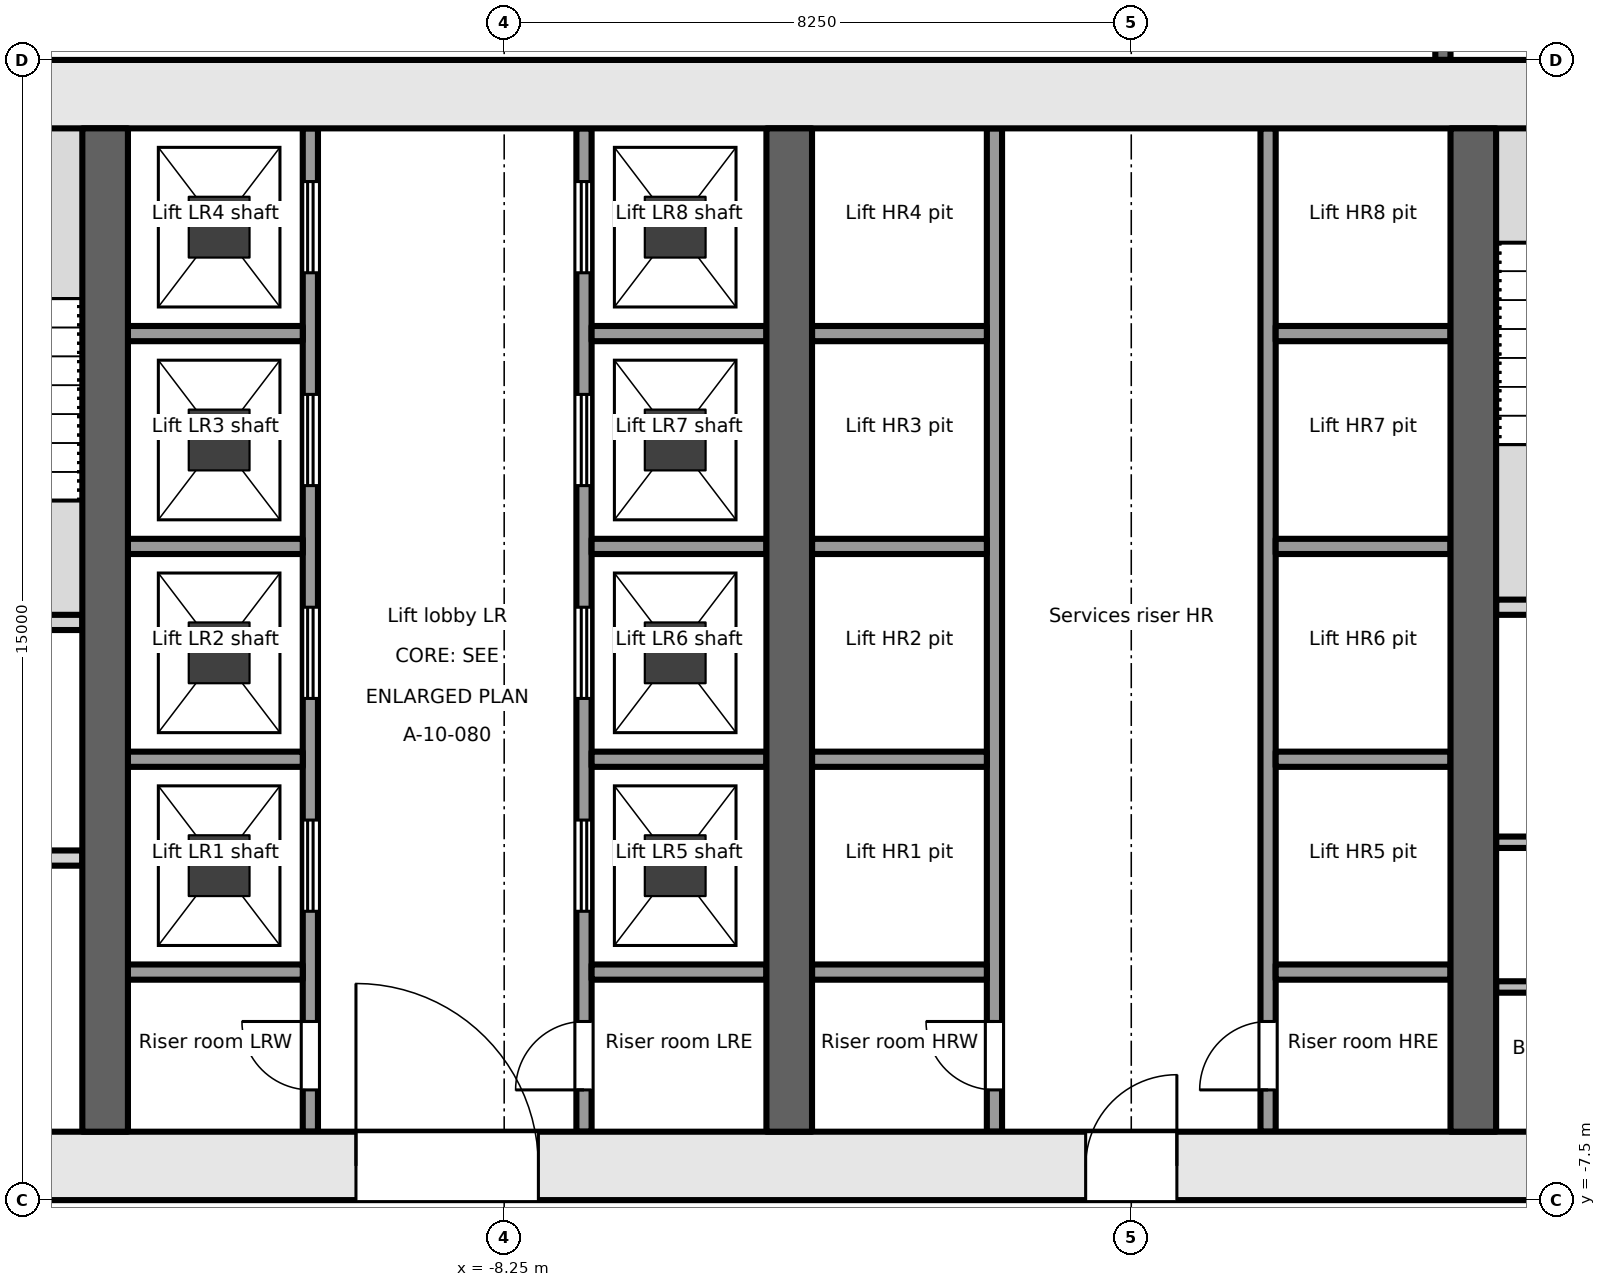
"""IFC4 building model, lengths in metres.
Left out: names, types, materials, properties, quantities, classifications, styles, units other than length and angle.
Written with IfcOpenShell. Run it as: python <this file> out.ifc"""

import sys

from ifc_helpers import new_model, si_unit, direction, frame, frame_2d, origin, place, context, subcontext, project, spatial, rectangle, extrude, element, fill, save


model = new_model("IFC4")
c1 = context("Model", 3, precision=1e-05, world=origin(), true_north=direction((0.0, 1.0)))
c2 = subcontext(c1, "Body", "Model", "MODEL_VIEW")
j1 = project(units=[si_unit("LENGTHUNIT", "METRE"), si_unit("PLANEANGLEUNIT", "RADIAN")], contexts=[c1])
p1 = place(None, origin())
s1 = spatial("IfcSite", under=j1, at=p1, CompositionType="ELEMENT")
p2 = place(p1, origin())
s2 = spatial("IfcBuilding", under=s1, at=p2, CompositionType="ELEMENT")
p3 = place(p2, frame((0.0, 0.0, -5.5)))
s3 = spatial("IfcBuildingStorey", under=s2, at=p3, CompositionType="ELEMENT", Elevation=-5.5)
p4 = place(p3, frame((-18.0, -7.05, -0.2), z_axis=(0.0, 0.0, 1.0), x_axis=(1.0, 0.0, 0.0)))
e1 = element("IfcWall", 1, at=p4, inside=s3, PredefinedType="SHEAR", context=c2, shape_type="SweptSolid", body=[
    extrude(rectangle(XDim=36.0, YDim=0.9, at=frame_2d((18.0, 0.0))), origin(), (0.0, 0.0, 1.0), 5.5),
])
p5 = place(p4, frame((7.8, 0.0, 0.2)))
e2 = element("IfcOpeningElement", 2, at=p5, cuts=e1, PredefinedType="OPENING", context=c2, shape_type="SweptSolid", body=[
    extrude(rectangle(XDim=2.4, YDim=2.1, at=frame_2d((1.2, 1.05))), frame((0.0, 0.46, 0.0), z_axis=(0.0, -1.0, 0.0), x_axis=(1.0, 0.0, 0.0)), (0.0, 0.0, 1.0), 0.921),
])
p6 = place(p4, frame((17.4, 0.0, 0.2)))
e3 = element("IfcOpeningElement", 3, at=p6, cuts=e1, PredefinedType="OPENING", context=c2, shape_type="SweptSolid", body=[
    extrude(rectangle(XDim=1.2, YDim=2.1, at=frame_2d((0.6, 1.05))), frame((0.0, 0.46, 0.0), z_axis=(0.0, -1.0, 0.0), x_axis=(1.0, 0.0, 0.0)), (0.0, 0.0, 1.0), 0.921),
])
p7 = place(p4, frame((26.1, 0.0, 0.2)))
e4 = element("IfcOpeningElement", 4, at=p7, cuts=e1, PredefinedType="OPENING", context=c2, shape_type="SweptSolid", body=[
    extrude(rectangle(XDim=2.4, YDim=2.1, at=frame_2d((1.2, 1.05))), frame((0.0, 0.46, 0.0), z_axis=(0.0, -1.0, 0.0), x_axis=(1.0, 0.0, 0.0)), (0.0, 0.0, 1.0), 0.921),
])
p8 = place(p3, frame((-18.0, 7.05, -0.2), z_axis=(0.0, 0.0, 1.0), x_axis=(1.0, 0.0, 0.0)))
e5 = element("IfcWall", 5, at=p8, inside=s3, PredefinedType="SHEAR", context=c2, shape_type="SweptSolid", body=[
    extrude(rectangle(XDim=36.0, YDim=0.9, at=frame_2d((18.0, 0.0))), origin(), (0.0, 0.0, 1.0), 5.5),
])
for number, where, z_axis, x_axis in (
    (6, (-13.5, -6.6, -0.2), (0.0, 0.0, 1.0), (0.0, 1.0, 0.0)),
    (7, (-4.5, -6.6, -0.2), (0.0, 0.0, 1.0), (0.0, 1.0, 0.0)),
    (8, (4.5, -6.6, -0.2), (0.0, 0.0, 1.0), (0.0, 1.0, 0.0)),
):
    element("IfcWall", number, at=place(p3, frame(where, z_axis=z_axis, x_axis=x_axis)), inside=s3, PredefinedType="SHEAR", context=c2, shape_type="SweptSolid", body=[
        extrude(rectangle(XDim=13.2, YDim=0.6, at=frame_2d((6.6, 0.0))), origin(), (0.0, 0.0, 1.0), 5.5),
    ])
p9 = place(p3, frame((-17.1, -3.0, 0.0), z_axis=(0.0, 0.0, 1.0), x_axis=(1.0, 0.0, 0.0)))
e9 = element("IfcWall", 9, at=p9, inside=s3, PredefinedType="PARTITIONING", context=c2, shape_type="SweptSolid", body=[
    extrude(rectangle(XDim=3.3, YDim=0.2, at=frame_2d((1.65, 0.0))), origin(), (0.0, 0.0, 1.0), 5.3),
])
p10 = place(p9, frame((1.1, 0.0, 0.0)))
e10 = element("IfcOpeningElement", 10, at=p10, cuts=e9, PredefinedType="OPENING", context=c2, shape_type="SweptSolid", body=[
    extrude(rectangle(XDim=1.1, YDim=2.1, at=frame_2d((0.55, 1.05))), frame((0.0, 0.111, 0.0), z_axis=(0.0, -1.0, 0.0), x_axis=(1.0, 0.0, 0.0)), (0.0, 0.0, 1.0), 0.221),
])
p11 = place(p3, frame((-17.1, 0.1, 0.0), z_axis=(0.0, 0.0, 1.0), x_axis=(1.0, 0.0, 0.0)))
e11 = element("IfcWall", 11, at=p11, inside=s3, PredefinedType="PARTITIONING", context=c2, shape_type="SweptSolid", body=[
    extrude(rectangle(XDim=3.3, YDim=0.2, at=frame_2d((1.65, 0.0))), origin(), (0.0, 0.0, 1.0), 5.3),
])
p12 = place(p11, frame((1.1, 0.0, 0.0)))
e12 = element("IfcOpeningElement", 12, at=p12, cuts=e11, PredefinedType="OPENING", context=c2, shape_type="SweptSolid", body=[
    extrude(rectangle(XDim=1.1, YDim=2.1, at=frame_2d((0.55, 1.05))), frame((0.0, 0.111, 0.0), z_axis=(0.0, -1.0, 0.0), x_axis=(1.0, 0.0, 0.0)), (0.0, 0.0, 1.0), 0.221),
])
p13 = place(p3, frame((-10.8, -6.6, 0.0), z_axis=(0.0, 0.0, 1.0), x_axis=(0.0, 1.0, 0.0)))
e13 = element("IfcWall", 13, at=p13, inside=s3, PredefinedType="PARTITIONING", context=c2, shape_type="SweptSolid", body=[
    extrude(rectangle(XDim=13.2, YDim=0.2, at=frame_2d((6.6, 0.0))), origin(), (0.0, 0.0, 1.0), 5.3),
])
p14 = place(p13, frame((0.55, 0.0, 0.0)))
e14 = element("IfcOpeningElement", 14, at=p14, cuts=e13, PredefinedType="OPENING", context=c2, shape_type="SweptSolid", body=[
    extrude(rectangle(XDim=0.9, YDim=2.1, at=frame_2d((0.45, 1.05))), frame((0.0, 0.111, 0.0), z_axis=(0.0, -1.0, 0.0), x_axis=(1.0, 0.0, 0.0)), (0.0, 0.0, 1.0), 0.221),
])
p15 = place(p13, frame((2.9, 0.0, 0.0)))
e15 = element("IfcOpeningElement", 15, at=p15, cuts=e13, PredefinedType="OPENING", context=c2, shape_type="SweptSolid", body=[
    extrude(rectangle(XDim=1.2, YDim=2.1, at=frame_2d((0.6, 1.05))), frame((0.0, 0.111, 0.0), z_axis=(0.0, -1.0, 0.0), x_axis=(1.0, 0.0, 0.0)), (0.0, 0.0, 1.0), 0.221),
])
p16 = place(p13, frame((5.7, 0.0, 0.0)))
e16 = element("IfcOpeningElement", 16, at=p16, cuts=e13, PredefinedType="OPENING", context=c2, shape_type="SweptSolid", body=[
    extrude(rectangle(XDim=1.2, YDim=2.1, at=frame_2d((0.6, 1.05))), frame((0.0, 0.111, 0.0), z_axis=(0.0, -1.0, 0.0), x_axis=(1.0, 0.0, 0.0)), (0.0, 0.0, 1.0), 0.221),
])
p17 = place(p13, frame((8.5, 0.0, 0.0)))
e17 = element("IfcOpeningElement", 17, at=p17, cuts=e13, PredefinedType="OPENING", context=c2, shape_type="SweptSolid", body=[
    extrude(rectangle(XDim=1.2, YDim=2.1, at=frame_2d((0.6, 1.05))), frame((0.0, 0.111, 0.0), z_axis=(0.0, -1.0, 0.0), x_axis=(1.0, 0.0, 0.0)), (0.0, 0.0, 1.0), 0.221),
])
p18 = place(p13, frame((11.3, 0.0, 0.0)))
e18 = element("IfcOpeningElement", 18, at=p18, cuts=e13, PredefinedType="OPENING", context=c2, shape_type="SweptSolid", body=[
    extrude(rectangle(XDim=1.2, YDim=2.1, at=frame_2d((0.6, 1.05))), frame((0.0, 0.111, 0.0), z_axis=(0.0, -1.0, 0.0), x_axis=(1.0, 0.0, 0.0)), (0.0, 0.0, 1.0), 0.221),
])
p19 = place(p3, frame((-7.2, -6.6, 0.0), z_axis=(0.0, 0.0, 1.0), x_axis=(0.0, 1.0, 0.0)))
e19 = element("IfcWall", 19, at=p19, inside=s3, PredefinedType="PARTITIONING", context=c2, shape_type="SweptSolid", body=[
    extrude(rectangle(XDim=13.2, YDim=0.2, at=frame_2d((6.6, 0.0))), origin(), (0.0, 0.0, 1.0), 5.3),
])
p20 = place(p19, frame((0.55, 0.0, 0.0)))
e20 = element("IfcOpeningElement", 20, at=p20, cuts=e19, PredefinedType="OPENING", context=c2, shape_type="SweptSolid", body=[
    extrude(rectangle(XDim=0.9, YDim=2.1, at=frame_2d((0.45, 1.05))), frame((0.0, 0.111, 0.0), z_axis=(0.0, -1.0, 0.0), x_axis=(1.0, 0.0, 0.0)), (0.0, 0.0, 1.0), 0.221),
])
p21 = place(p19, frame((2.9, 0.0, 0.0)))
e21 = element("IfcOpeningElement", 21, at=p21, cuts=e19, PredefinedType="OPENING", context=c2, shape_type="SweptSolid", body=[
    extrude(rectangle(XDim=1.2, YDim=2.1, at=frame_2d((0.6, 1.05))), frame((0.0, 0.111, 0.0), z_axis=(0.0, -1.0, 0.0), x_axis=(1.0, 0.0, 0.0)), (0.0, 0.0, 1.0), 0.221),
])
p22 = place(p19, frame((5.7, 0.0, 0.0)))
e22 = element("IfcOpeningElement", 22, at=p22, cuts=e19, PredefinedType="OPENING", context=c2, shape_type="SweptSolid", body=[
    extrude(rectangle(XDim=1.2, YDim=2.1, at=frame_2d((0.6, 1.05))), frame((0.0, 0.111, 0.0), z_axis=(0.0, -1.0, 0.0), x_axis=(1.0, 0.0, 0.0)), (0.0, 0.0, 1.0), 0.221),
])
p23 = place(p19, frame((8.5, 0.0, 0.0)))
e23 = element("IfcOpeningElement", 23, at=p23, cuts=e19, PredefinedType="OPENING", context=c2, shape_type="SweptSolid", body=[
    extrude(rectangle(XDim=1.2, YDim=2.1, at=frame_2d((0.6, 1.05))), frame((0.0, 0.111, 0.0), z_axis=(0.0, -1.0, 0.0), x_axis=(1.0, 0.0, 0.0)), (0.0, 0.0, 1.0), 0.221),
])
p24 = place(p19, frame((11.3, 0.0, 0.0)))
e24 = element("IfcOpeningElement", 24, at=p24, cuts=e19, PredefinedType="OPENING", context=c2, shape_type="SweptSolid", body=[
    extrude(rectangle(XDim=1.2, YDim=2.1, at=frame_2d((0.6, 1.05))), frame((0.0, 0.111, 0.0), z_axis=(0.0, -1.0, 0.0), x_axis=(1.0, 0.0, 0.0)), (0.0, 0.0, 1.0), 0.221),
])
for number, where, z_axis, x_axis in (
    (25, (-13.2, -1.7, 0.0), (0.0, 0.0, 1.0), (1.0, 0.0, 0.0)),
    (26, (-13.2, 1.1, 0.0), (0.0, 0.0, 1.0), (1.0, 0.0, 0.0)),
    (27, (-13.2, 3.9, 0.0), (0.0, 0.0, 1.0), (1.0, 0.0, 0.0)),
    (28, (-13.2, -4.5, 0.0), (0.0, 0.0, 1.0), (1.0, 0.0, 0.0)),
    (29, (-7.1, -1.7, 0.0), (0.0, 0.0, 1.0), (1.0, 0.0, 0.0)),
    (30, (-7.1, 1.1, 0.0), (0.0, 0.0, 1.0), (1.0, 0.0, 0.0)),
    (31, (-7.1, 3.9, 0.0), (0.0, 0.0, 1.0), (1.0, 0.0, 0.0)),
    (32, (-7.1, -4.5, 0.0), (0.0, 0.0, 1.0), (1.0, 0.0, 0.0)),
):
    element("IfcWall", number, at=place(p3, frame(where, z_axis=z_axis, x_axis=x_axis)), inside=s3, PredefinedType="PARTITIONING", context=c2, shape_type="SweptSolid", body=[
        extrude(rectangle(XDim=2.3, YDim=0.2, at=frame_2d((1.15, 0.0))), origin(), (0.0, 0.0, 1.0), 5.3),
    ])
p25 = place(p3, frame((-1.8, -6.6, 0.0), z_axis=(0.0, 0.0, 1.0), x_axis=(0.0, 1.0, 0.0)))
e33 = element("IfcWall", 33, at=p25, inside=s3, PredefinedType="PARTITIONING", context=c2, shape_type="SweptSolid", body=[
    extrude(rectangle(XDim=13.2, YDim=0.2, at=frame_2d((6.6, 0.0))), origin(), (0.0, 0.0, 1.0), 5.3),
])
p26 = place(p25, frame((0.55, 0.0, 0.0)))
e34 = element("IfcOpeningElement", 34, at=p26, cuts=e33, PredefinedType="OPENING", context=c2, shape_type="SweptSolid", body=[
    extrude(rectangle(XDim=0.9, YDim=2.1, at=frame_2d((0.45, 1.05))), frame((0.0, 0.111, 0.0), z_axis=(0.0, -1.0, 0.0), x_axis=(1.0, 0.0, 0.0)), (0.0, 0.0, 1.0), 0.221),
])
p27 = place(p3, frame((1.8, -6.6, 0.0), z_axis=(0.0, 0.0, 1.0), x_axis=(0.0, 1.0, 0.0)))
e35 = element("IfcWall", 35, at=p27, inside=s3, PredefinedType="PARTITIONING", context=c2, shape_type="SweptSolid", body=[
    extrude(rectangle(XDim=13.2, YDim=0.2, at=frame_2d((6.6, 0.0))), origin(), (0.0, 0.0, 1.0), 5.3),
])
p28 = place(p27, frame((0.55, 0.0, 0.0)))
e36 = element("IfcOpeningElement", 36, at=p28, cuts=e35, PredefinedType="OPENING", context=c2, shape_type="SweptSolid", body=[
    extrude(rectangle(XDim=0.9, YDim=2.1, at=frame_2d((0.45, 1.05))), frame((0.0, 0.111, 0.0), z_axis=(0.0, -1.0, 0.0), x_axis=(1.0, 0.0, 0.0)), (0.0, 0.0, 1.0), 0.221),
])
for number, where, z_axis, x_axis in (
    (37, (-4.2, -1.7, 0.0), (0.0, 0.0, 1.0), (1.0, 0.0, 0.0)),
    (38, (-4.2, 1.1, 0.0), (0.0, 0.0, 1.0), (1.0, 0.0, 0.0)),
    (39, (-4.2, 3.9, 0.0), (0.0, 0.0, 1.0), (1.0, 0.0, 0.0)),
    (40, (-4.2, -4.5, 0.0), (0.0, 0.0, 1.0), (1.0, 0.0, 0.0)),
    (41, (1.9, -1.7, 0.0), (0.0, 0.0, 1.0), (1.0, 0.0, 0.0)),
    (42, (1.9, 1.1, 0.0), (0.0, 0.0, 1.0), (1.0, 0.0, 0.0)),
    (43, (1.9, 3.9, 0.0), (0.0, 0.0, 1.0), (1.0, 0.0, 0.0)),
    (44, (1.9, -4.5, 0.0), (0.0, 0.0, 1.0), (1.0, 0.0, 0.0)),
):
    element("IfcWall", number, at=place(p3, frame(where, z_axis=z_axis, x_axis=x_axis)), inside=s3, PredefinedType="PARTITIONING", context=c2, shape_type="SweptSolid", body=[
        extrude(rectangle(XDim=2.3, YDim=0.2, at=frame_2d((1.15, 0.0))), origin(), (0.0, 0.0, 1.0), 5.3),
    ])
p29 = place(p3, frame((4.8, 0.3, 0.0), z_axis=(0.0, 0.0, 1.0), x_axis=(1.0, 0.0, 0.0)))
e45 = element("IfcWall", 45, at=p29, inside=s3, PredefinedType="PARTITIONING", context=c2, shape_type="SweptSolid", body=[
    extrude(rectangle(XDim=3.15, YDim=0.2, at=frame_2d((1.575, 0.0))), origin(), (0.0, 0.0, 1.0), 5.3),
])
for number, where, z_axis, x_axis in (
    (46, (4.8, -4.696, 0.0), (0.0, 0.0, 1.0), (1.0, 0.0, 0.0)),
    (47, (4.8, -2.792, 0.0), (0.0, 0.0, 1.0), (1.0, 0.0, 0.0)),
):
    element("IfcWall", number, at=place(p3, frame(where, z_axis=z_axis, x_axis=x_axis)), inside=s3, PredefinedType="PARTITIONING", context=c2, shape_type="SweptSolid", body=[
        extrude(rectangle(XDim=3.15, YDim=0.15, at=frame_2d((1.575, 0.0))), origin(), (0.0, 0.0, 1.0), 5.3),
    ])
p30 = place(p3, frame((4.1, 13.74, 0.0), z_axis=(0.0, 0.0, 1.0), x_axis=(0.0, -1.0, 0.0)))
e48 = element("IfcWall", 48, at=p30, inside=s3, PredefinedType="PARTITIONING", context=c2, shape_type="SweptSolid", body=[
    extrude(rectangle(XDim=6.24, YDim=0.2, at=frame_2d((3.12, 0.0))), origin(), (0.0, 0.0, 1.0), 4.3),
])
p31 = place(p14, origin())
e49 = element("IfcDoor", 49, at=p31, inside=s3, OperationType="SINGLE_SWING_RIGHT", PredefinedType="DOOR", context=c2, shape_type="SweptSolid", body=[
    extrude(rectangle(XDim=0.9, YDim=2.1, at=frame_2d((0.45, 1.05))), frame((0.0, 0.025, 0.0), z_axis=(0.0, -1.0, 0.0), x_axis=(1.0, 0.0, 0.0)), (0.0, 0.0, 1.0), 0.05),
])
fill(e14, e49)
p32 = place(p15, origin())
e50 = element("IfcDoor", 50, at=p32, inside=s3, OperationType="DOUBLE_DOOR_SLIDING", PredefinedType="DOOR", context=c2, shape_type="SweptSolid", body=[
    extrude(rectangle(XDim=1.2, YDim=2.1, at=frame_2d((0.6, 1.05))), frame((0.0, 0.025, 0.0), z_axis=(0.0, -1.0, 0.0), x_axis=(1.0, 0.0, 0.0)), (0.0, 0.0, 1.0), 0.05),
])
fill(e15, e50)
p33 = place(p16, origin())
e51 = element("IfcDoor", 51, at=p33, inside=s3, OperationType="DOUBLE_DOOR_SLIDING", PredefinedType="DOOR", context=c2, shape_type="SweptSolid", body=[
    extrude(rectangle(XDim=1.2, YDim=2.1, at=frame_2d((0.6, 1.05))), frame((0.0, 0.025, 0.0), z_axis=(0.0, -1.0, 0.0), x_axis=(1.0, 0.0, 0.0)), (0.0, 0.0, 1.0), 0.05),
])
fill(e16, e51)
p34 = place(p17, origin())
e52 = element("IfcDoor", 52, at=p34, inside=s3, OperationType="DOUBLE_DOOR_SLIDING", PredefinedType="DOOR", context=c2, shape_type="SweptSolid", body=[
    extrude(rectangle(XDim=1.2, YDim=2.1, at=frame_2d((0.6, 1.05))), frame((0.0, 0.025, 0.0), z_axis=(0.0, -1.0, 0.0), x_axis=(1.0, 0.0, 0.0)), (0.0, 0.0, 1.0), 0.05),
])
fill(e17, e52)
p35 = place(p18, origin())
e53 = element("IfcDoor", 53, at=p35, inside=s3, OperationType="DOUBLE_DOOR_SLIDING", PredefinedType="DOOR", context=c2, shape_type="SweptSolid", body=[
    extrude(rectangle(XDim=1.2, YDim=2.1, at=frame_2d((0.6, 1.05))), frame((0.0, 0.025, 0.0), z_axis=(0.0, -1.0, 0.0), x_axis=(1.0, 0.0, 0.0)), (0.0, 0.0, 1.0), 0.05),
])
fill(e18, e53)
p36 = place(p20, origin())
e54 = element("IfcDoor", 54, at=p36, inside=s3, OperationType="SINGLE_SWING_LEFT", PredefinedType="DOOR", context=c2, shape_type="SweptSolid", body=[
    extrude(rectangle(XDim=0.9, YDim=2.1, at=frame_2d((0.45, 1.05))), frame((0.0, 0.025, 0.0), z_axis=(0.0, -1.0, 0.0), x_axis=(1.0, 0.0, 0.0)), (0.0, 0.0, 1.0), 0.05),
])
fill(e20, e54)
p37 = place(p21, origin())
e55 = element("IfcDoor", 55, at=p37, inside=s3, OperationType="DOUBLE_DOOR_SLIDING", PredefinedType="DOOR", context=c2, shape_type="SweptSolid", body=[
    extrude(rectangle(XDim=1.2, YDim=2.1, at=frame_2d((0.6, 1.05))), frame((0.0, 0.025, 0.0), z_axis=(0.0, -1.0, 0.0), x_axis=(1.0, 0.0, 0.0)), (0.0, 0.0, 1.0), 0.05),
])
fill(e21, e55)
p38 = place(p22, origin())
e56 = element("IfcDoor", 56, at=p38, inside=s3, OperationType="DOUBLE_DOOR_SLIDING", PredefinedType="DOOR", context=c2, shape_type="SweptSolid", body=[
    extrude(rectangle(XDim=1.2, YDim=2.1, at=frame_2d((0.6, 1.05))), frame((0.0, 0.025, 0.0), z_axis=(0.0, -1.0, 0.0), x_axis=(1.0, 0.0, 0.0)), (0.0, 0.0, 1.0), 0.05),
])
fill(e22, e56)
p39 = place(p23, origin())
e57 = element("IfcDoor", 57, at=p39, inside=s3, OperationType="DOUBLE_DOOR_SLIDING", PredefinedType="DOOR", context=c2, shape_type="SweptSolid", body=[
    extrude(rectangle(XDim=1.2, YDim=2.1, at=frame_2d((0.6, 1.05))), frame((0.0, 0.025, 0.0), z_axis=(0.0, -1.0, 0.0), x_axis=(1.0, 0.0, 0.0)), (0.0, 0.0, 1.0), 0.05),
])
fill(e23, e57)
p40 = place(p24, origin())
e58 = element("IfcDoor", 58, at=p40, inside=s3, OperationType="DOUBLE_DOOR_SLIDING", PredefinedType="DOOR", context=c2, shape_type="SweptSolid", body=[
    extrude(rectangle(XDim=1.2, YDim=2.1, at=frame_2d((0.6, 1.05))), frame((0.0, 0.025, 0.0), z_axis=(0.0, -1.0, 0.0), x_axis=(1.0, 0.0, 0.0)), (0.0, 0.0, 1.0), 0.05),
])
fill(e24, e58)
p41 = place(p5, origin())
e59 = element("IfcDoor", 59, at=p41, inside=s3, OperationType="DOUBLE_DOOR_DOUBLE_SWING", PredefinedType="DOOR", context=c2, shape_type="SweptSolid", body=[
    extrude(rectangle(XDim=2.4, YDim=2.1, at=frame_2d((1.2, 1.05))), frame((0.0, 0.025, 0.0), z_axis=(0.0, -1.0, 0.0), x_axis=(1.0, 0.0, 0.0)), (0.0, 0.0, 1.0), 0.05),
])
fill(e2, e59)
p42 = place(p26, origin())
e60 = element("IfcDoor", 60, at=p42, inside=s3, OperationType="SINGLE_SWING_RIGHT", PredefinedType="DOOR", context=c2, shape_type="SweptSolid", body=[
    extrude(rectangle(XDim=0.9, YDim=2.1, at=frame_2d((0.45, 1.05))), frame((0.0, 0.025, 0.0), z_axis=(0.0, -1.0, 0.0), x_axis=(1.0, 0.0, 0.0)), (0.0, 0.0, 1.0), 0.05),
])
fill(e34, e60)
p43 = place(p28, origin())
e61 = element("IfcDoor", 61, at=p43, inside=s3, OperationType="SINGLE_SWING_LEFT", PredefinedType="DOOR", context=c2, shape_type="SweptSolid", body=[
    extrude(rectangle(XDim=0.9, YDim=2.1, at=frame_2d((0.45, 1.05))), frame((0.0, 0.025, 0.0), z_axis=(0.0, -1.0, 0.0), x_axis=(1.0, 0.0, 0.0)), (0.0, 0.0, 1.0), 0.05),
])
fill(e36, e61)
p44 = place(p6, origin())
e62 = element("IfcDoor", 62, at=p44, inside=s3, OperationType="SINGLE_SWING_RIGHT", PredefinedType="DOOR", context=c2, shape_type="SweptSolid", body=[
    extrude(rectangle(XDim=1.2, YDim=2.1, at=frame_2d((0.6, 1.05))), frame((0.0, 0.025, 0.0), z_axis=(0.0, -1.0, 0.0), x_axis=(1.0, 0.0, 0.0)), (0.0, 0.0, 1.0), 0.05),
])
fill(e3, e62)
save(model, sys.argv[1])
